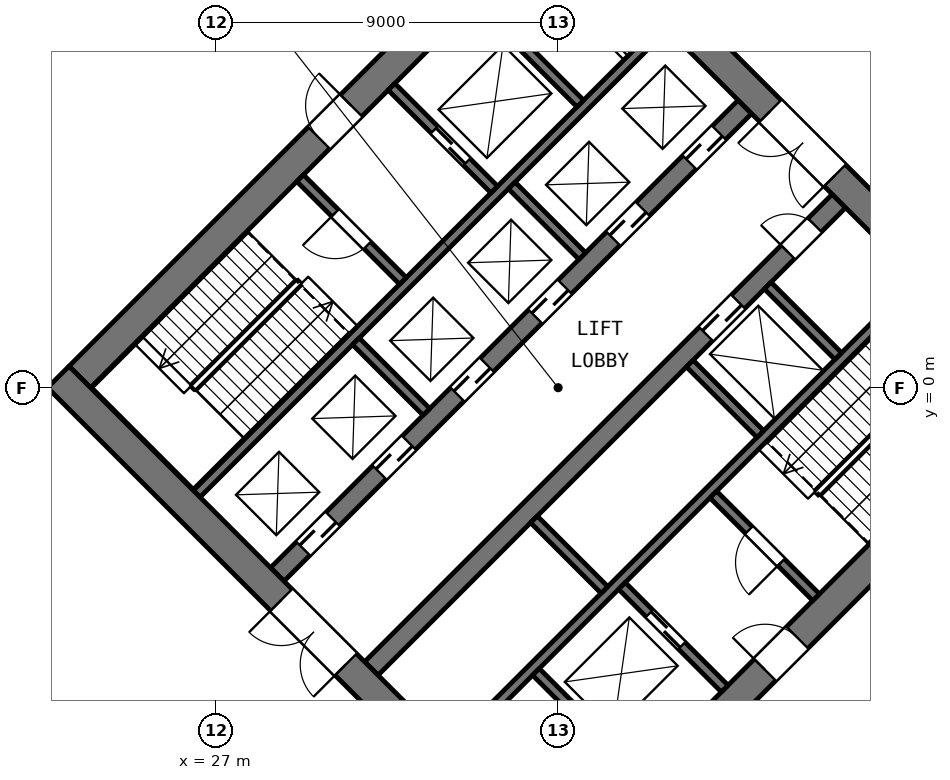
"""IFC4 building model, lengths in metres.
Left out: names, types, materials, properties, quantities, classifications, styles, units other than length and angle.
Written with IfcOpenShell. Run it as: python <this file> out.ifc"""

import sys

from ifc_helpers import new_model, si_unit, direction, frame, frame_2d, origin, place, context, subcontext, project, spatial, rectangle, extrude, element, fill, save


model = new_model("IFC4")
c1 = context("Model", 3, precision=1e-05, world=origin(), true_north=direction((0.0, 1.0)))
c2 = subcontext(c1, "Body", "Model", "MODEL_VIEW")
j1 = project(units=[si_unit("LENGTHUNIT", "METRE"), si_unit("PLANEANGLEUNIT", "RADIAN")], contexts=[c1])
p1 = place(None, origin())
s1 = spatial("IfcSite", under=j1, at=p1, CompositionType="ELEMENT")
p2 = place(p1, origin())
s2 = spatial("IfcBuilding", under=s1, at=p2, CompositionType="ELEMENT")
p3 = place(p2, frame((0.0, 0.0, 12.6)))
s3 = spatial("IfcBuildingStorey", under=s2, at=p3, CompositionType="ELEMENT", Elevation=12.6)
p4 = place(p3, frame((36.283, -12.586, 0.0), z_axis=(0.0, 0.0, 1.0), x_axis=(0.707106781187, 0.707106781187, 0.0)))
e1 = element("IfcWall", 1, at=p4, inside=s3, PredefinedType="SHEAR", context=c2, shape_type="SweptSolid", body=[
    extrude(rectangle(XDim=17.4, YDim=0.8, at=frame_2d((8.7, 0.0))), origin(), (0.0, 0.0, 1.0), 5.1),
])
p5 = place(p4, frame((7.3, 0.0, 0.0)))
e2 = element("IfcOpeningElement", 2, at=p5, cuts=e1, PredefinedType="OPENING", context=c2, shape_type="SweptSolid", body=[
    extrude(rectangle(XDim=1.2, YDim=2.1, at=frame_2d((0.6, 1.05))), frame((0.0, 0.41, 0.0), z_axis=(0.0, -1.0, 0.0), x_axis=(1.0, 0.0, 0.0)), (0.0, 0.0, 1.0), 0.82),
])
p6 = place(p4, frame((1.0, 0.0, 0.0)))
e3 = element("IfcOpeningElement", 3, at=p6, cuts=e1, PredefinedType="OPENING", context=c2, shape_type="SweptSolid", body=[
    extrude(rectangle(XDim=1.0, YDim=2.1, at=frame_2d((0.5, 1.05))), frame((0.0, 0.41, 0.0), z_axis=(0.0, -1.0, 0.0), x_axis=(1.0, 0.0, 0.0)), (0.0, 0.0, 1.0), 0.82),
])
p7 = place(p3, frame((33.207, -9.51, 0.0), z_axis=(0.0, 0.0, 1.0), x_axis=(0.707106781187, 0.707106781187, 0.0)))
e4 = element("IfcWall", 4, at=p7, inside=s3, PredefinedType="SHEAR", context=c2, shape_type="SweptSolid", body=[
    extrude(rectangle(XDim=17.4, YDim=0.25, at=frame_2d((8.7, 0.0))), origin(), (0.0, 0.0, 1.0), 5.1),
])
p8 = place(p3, frame((31.086, -7.389, 0.0), z_axis=(0.0, 0.0, 1.0), x_axis=(0.707106781187, 0.707106781187, 0.0)))
e5 = element("IfcWall", 5, at=p8, inside=s3, PredefinedType="SHEAR", context=c2, shape_type="SweptSolid", body=[
    extrude(rectangle(XDim=17.4, YDim=0.5, at=frame_2d((8.7, 0.0))), origin(), (0.0, 0.0, 1.0), 5.1),
])
p9 = place(p8, frame((12.45, 0.0, 0.0)))
e6 = element("IfcOpeningElement", 6, at=p9, cuts=e5, PredefinedType="OPENING", context=c2, shape_type="SweptSolid", body=[
    extrude(rectangle(XDim=1.2, YDim=2.1, at=frame_2d((0.6, 1.05))), frame((0.0, 0.26, 0.0), z_axis=(0.0, -1.0, 0.0), x_axis=(1.0, 0.0, 0.0)), (0.0, 0.0, 1.0), 0.52),
])
p10 = place(p8, frame((15.5, 0.0, 0.0)))
e7 = element("IfcOpeningElement", 7, at=p10, cuts=e5, PredefinedType="OPENING", context=c2, shape_type="SweptSolid", body=[
    extrude(rectangle(XDim=1.0, YDim=2.1, at=frame_2d((0.5, 1.05))), frame((0.0, 0.26, 0.0), z_axis=(0.0, -1.0, 0.0), x_axis=(1.0, 0.0, 0.0)), (0.0, 0.0, 1.0), 0.52),
])
p11 = place(p3, frame((28.611, -4.914, 0.0), z_axis=(0.0, 0.0, 1.0), x_axis=(0.707106781187, 0.707106781187, 0.0)))
e8 = element("IfcWall", 8, at=p11, inside=s3, PredefinedType="SHEAR", context=c2, shape_type="SweptSolid", body=[
    extrude(rectangle(XDim=17.4, YDim=0.5, at=frame_2d((8.7, 0.0))), origin(), (0.0, 0.0, 1.0), 5.1),
])
p12 = place(p11, frame((0.962, 0.0, 0.0)))
e9 = element("IfcOpeningElement", 9, at=p12, cuts=e8, PredefinedType="OPENING", context=c2, shape_type="SweptSolid", body=[
    extrude(rectangle(XDim=1.1, YDim=2.1, at=frame_2d((0.55, 1.05))), frame((0.0, 0.26, 0.0), z_axis=(0.0, -1.0, 0.0), x_axis=(1.0, 0.0, 0.0)), (0.0, 0.0, 1.0), 0.52),
])
p13 = place(p11, frame((3.8, 0.0, 0.0)))
e10 = element("IfcOpeningElement", 10, at=p13, cuts=e8, PredefinedType="OPENING", context=c2, shape_type="SweptSolid", body=[
    extrude(rectangle(XDim=1.1, YDim=2.1, at=frame_2d((0.55, 1.05))), frame((0.0, 0.26, 0.0), z_axis=(0.0, -1.0, 0.0), x_axis=(1.0, 0.0, 0.0)), (0.0, 0.0, 1.0), 0.52),
])
p14 = place(p11, frame((6.7, 0.0, 0.0)))
e11 = element("IfcOpeningElement", 11, at=p14, cuts=e8, PredefinedType="OPENING", context=c2, shape_type="SweptSolid", body=[
    extrude(rectangle(XDim=1.1, YDim=2.1, at=frame_2d((0.55, 1.05))), frame((0.0, 0.26, 0.0), z_axis=(0.0, -1.0, 0.0), x_axis=(1.0, 0.0, 0.0)), (0.0, 0.0, 1.0), 0.52),
])
p15 = place(p11, frame((9.6, 0.0, 0.0)))
e12 = element("IfcOpeningElement", 12, at=p15, cuts=e8, PredefinedType="OPENING", context=c2, shape_type="SweptSolid", body=[
    extrude(rectangle(XDim=1.1, YDim=2.1, at=frame_2d((0.55, 1.05))), frame((0.0, 0.26, 0.0), z_axis=(0.0, -1.0, 0.0), x_axis=(1.0, 0.0, 0.0)), (0.0, 0.0, 1.0), 0.52),
])
p16 = place(p11, frame((12.5, 0.0, 0.0)))
e13 = element("IfcOpeningElement", 13, at=p16, cuts=e8, PredefinedType="OPENING", context=c2, shape_type="SweptSolid", body=[
    extrude(rectangle(XDim=1.1, YDim=2.1, at=frame_2d((0.55, 1.05))), frame((0.0, 0.26, 0.0), z_axis=(0.0, -1.0, 0.0), x_axis=(1.0, 0.0, 0.0)), (0.0, 0.0, 1.0), 0.52),
])
p17 = place(p11, frame((15.337, 0.0, 0.0)))
e14 = element("IfcOpeningElement", 14, at=p17, cuts=e8, PredefinedType="OPENING", context=c2, shape_type="SweptSolid", body=[
    extrude(rectangle(XDim=1.1, YDim=2.1, at=frame_2d((0.55, 1.05))), frame((0.0, 0.26, 0.0), z_axis=(0.0, -1.0, 0.0), x_axis=(1.0, 0.0, 0.0)), (0.0, 0.0, 1.0), 0.52),
])
p18 = place(p3, frame((26.49, -2.793, 0.0), z_axis=(0.0, 0.0, 1.0), x_axis=(0.707106781187, 0.707106781187, 0.0)))
e15 = element("IfcWall", 15, at=p18, inside=s3, PredefinedType="SHEAR", context=c2, shape_type="SweptSolid", body=[
    extrude(rectangle(XDim=17.4, YDim=0.25, at=frame_2d((8.7, 0.0))), origin(), (0.0, 0.0, 1.0), 5.1),
])
p19 = place(p3, frame((23.414, 0.283, 0.0), z_axis=(0.0, 0.0, 1.0), x_axis=(0.707106781187, 0.707106781187, 0.0)))
e16 = element("IfcWall", 16, at=p19, inside=s3, PredefinedType="SHEAR", context=c2, shape_type="SweptSolid", body=[
    extrude(rectangle(XDim=17.4, YDim=0.8, at=frame_2d((8.7, 0.0))), origin(), (0.0, 0.0, 1.0), 5.1),
])
p20 = place(p19, frame((8.9, 0.0, 0.0)))
e17 = element("IfcOpeningElement", 17, at=p20, cuts=e16, PredefinedType="OPENING", context=c2, shape_type="SweptSolid", body=[
    extrude(rectangle(XDim=1.2, YDim=2.1, at=frame_2d((0.6, 1.05))), frame((0.0, 0.41, 0.0), z_axis=(0.0, -1.0, 0.0), x_axis=(1.0, 0.0, 0.0)), (0.0, 0.0, 1.0), 0.82),
])
p21 = place(p19, frame((14.8, 0.0, 0.0)))
e18 = element("IfcOpeningElement", 18, at=p21, cuts=e16, PredefinedType="OPENING", context=c2, shape_type="SweptSolid", body=[
    extrude(rectangle(XDim=0.9, YDim=2.1, at=frame_2d((0.45, 1.05))), frame((0.0, 0.41, 0.0), z_axis=(0.0, -1.0, 0.0), x_axis=(1.0, 0.0, 0.0)), (0.0, 0.0, 1.0), 0.82),
])
p22 = place(p19, frame((16.3, 0.0, 0.0)))
e19 = element("IfcOpeningElement", 19, at=p22, cuts=e16, PredefinedType="OPENING", context=c2, shape_type="SweptSolid", body=[
    extrude(rectangle(XDim=0.9, YDim=2.1, at=frame_2d((0.45, 1.05))), frame((0.0, 0.41, 0.0), z_axis=(0.0, -1.0, 0.0), x_axis=(1.0, 0.0, 0.0)), (0.0, 0.0, 1.0), 0.82),
])
p23 = place(p3, frame((36.283, -13.152, 0.0), z_axis=(0.0, 0.0, 1.0), x_axis=(-0.707106781187, 0.707106781187, 0.0)))
e20 = element("IfcWall", 20, at=p23, inside=s3, PredefinedType="SHEAR", context=c2, shape_type="SweptSolid", body=[
    extrude(rectangle(XDim=19.0, YDim=0.8, at=frame_2d((9.5, 0.0))), origin(), (0.0, 0.0, 1.0), 5.1),
])
p24 = place(p23, frame((8.3, 0.0, 0.0)))
e21 = element("IfcOpeningElement", 21, at=p24, cuts=e20, PredefinedType="OPENING", context=c2, shape_type="SweptSolid", body=[
    extrude(rectangle(XDim=2.4, YDim=2.1, at=frame_2d((1.2, 1.05))), frame((0.0, 0.41, 0.0), z_axis=(0.0, -1.0, 0.0), x_axis=(1.0, 0.0, 0.0)), (0.0, 0.0, 1.0), 0.82),
])
p25 = place(p3, frame((38.121, -10.182, 0.0), z_axis=(0.0, 0.0, 1.0), x_axis=(-0.707138693938, 0.707074866995, 0.0)))
e22 = element("IfcWall", 22, at=p25, inside=s3, PredefinedType="SHEAR", context=c2, shape_type="SweptSolid", body=[
    extrude(rectangle(XDim=3.825, YDim=0.25, at=frame_2d((1.913, 0.0))), origin(), (0.0, 0.0, 1.0), 5.1),
])
for number, where, z_axis, x_axis in (
    (23, (37.22, -5.321, 0.0), (0.0, 0.0, 1.0), (-0.707, 0.707, 0.0)),
    (24, (32.535, -0.636, 0.0), (0.0, 0.0, 1.0), (-0.707, 0.707, 0.0)),
):
    element("IfcWall", number, at=place(p3, frame(where, z_axis=z_axis, x_axis=x_axis)), inside=s3, PredefinedType="SHEAR", context=c2, shape_type="SweptSolid", body=[
        extrude(rectangle(XDim=2.625, YDim=0.25, at=frame_2d((1.312, 0.0))), origin(), (0.0, 0.0, 1.0), 5.1),
    ])
p26 = place(p3, frame((40.384, -7.92, 0.0), z_axis=(0.0, 0.0, 1.0), x_axis=(-0.707074866995, 0.707138693938, 0.0)))
e25 = element("IfcWall", 25, at=p26, inside=s3, PredefinedType="SHEAR", context=c2, shape_type="SweptSolid", body=[
    extrude(rectangle(XDim=3.825, YDim=0.25, at=frame_2d((1.913, 0.0))), origin(), (0.0, 0.0, 1.0), 5.1),
])
p27 = place(p26, frame((1.6, 0.0, 0.0)))
e26 = element("IfcOpeningElement", 26, at=p27, cuts=e25, PredefinedType="OPENING", context=c2, shape_type="SweptSolid", body=[
    extrude(rectangle(XDim=1.2, YDim=2.1, at=frame_2d((0.6, 1.05))), frame((0.0, 0.135, 0.0), z_axis=(0.0, -1.0, 0.0), x_axis=(1.0, 0.0, 0.0)), (0.0, 0.0, 1.0), 0.27),
])
p28 = place(p3, frame((31.917, 2.811, 0.0), z_axis=(0.0, 0.0, 1.0), x_axis=(-0.707106781187, 0.707106781187, 0.0)))
e27 = element("IfcWall", 27, at=p28, inside=s3, PredefinedType="SHEAR", context=c2, shape_type="SweptSolid", body=[
    extrude(rectangle(XDim=3.825, YDim=0.25, at=frame_2d((1.913, 0.0))), origin(), (0.0, 0.0, 1.0), 5.1),
])
p29 = place(p28, frame((1.325, 0.0, 0.0)))
e28 = element("IfcOpeningElement", 28, at=p29, cuts=e27, PredefinedType="OPENING", context=c2, shape_type="SweptSolid", body=[
    extrude(rectangle(XDim=1.2, YDim=2.1, at=frame_2d((0.6, 1.05))), frame((0.0, 0.135, 0.0), z_axis=(0.0, -1.0, 0.0), x_axis=(1.0, 0.0, 0.0)), (0.0, 0.0, 1.0), 0.27),
])
p30 = place(p3, frame((42.788, -5.515, 0.0), z_axis=(0.0, 0.0, 1.0), x_axis=(-0.707106781187, 0.707106781187, 0.0)))
e29 = element("IfcWall", 29, at=p30, inside=s3, PredefinedType="SHEAR", context=c2, shape_type="SweptSolid", body=[
    extrude(rectangle(XDim=3.825, YDim=0.25, at=frame_2d((1.913, 0.0))), origin(), (0.0, 0.0, 1.0), 5.1),
])
p31 = place(p30, frame((1.3, 0.0, 0.0)))
e30 = element("IfcOpeningElement", 30, at=p31, cuts=e29, PredefinedType="OPENING", context=c2, shape_type="SweptSolid", body=[
    extrude(rectangle(XDim=1.2, YDim=2.1, at=frame_2d((0.6, 1.05))), frame((0.0, 0.135, 0.0), z_axis=(0.0, -1.0, 0.0), x_axis=(1.0, 0.0, 0.0)), (0.0, 0.0, 1.0), 0.27),
])
p32 = place(p3, frame((34.321, 5.215, 0.0), z_axis=(0.0, 0.0, 1.0), x_axis=(-0.707074866995, 0.707138693938, 0.0)))
e31 = element("IfcWall", 31, at=p32, inside=s3, PredefinedType="SHEAR", context=c2, shape_type="SweptSolid", body=[
    extrude(rectangle(XDim=3.825, YDim=0.25, at=frame_2d((1.913, 0.0))), origin(), (0.0, 0.0, 1.0), 5.1),
])
p33 = place(p32, frame((1.025, 0.0, 0.0)))
e32 = element("IfcOpeningElement", 32, at=p33, cuts=e31, PredefinedType="OPENING", context=c2, shape_type="SweptSolid", body=[
    extrude(rectangle(XDim=1.2, YDim=2.1, at=frame_2d((0.6, 1.05))), frame((0.0, 0.135, 0.0), z_axis=(0.0, -1.0, 0.0), x_axis=(1.0, 0.0, 0.0)), (0.0, 0.0, 1.0), 0.27),
])
for number, where, z_axis, x_axis in (
    (33, (41.321, -1.22, 0.0), (0.0, 0.0, 1.0), (-0.707, 0.707, 0.0)),
    (34, (36.636, 3.465, 0.0), (0.0, 0.0, 1.0), (-0.707, 0.707, 0.0)),
):
    element("IfcWall", number, at=place(p3, frame(where, z_axis=z_axis, x_axis=x_axis)), inside=s3, PredefinedType="SHEAR", context=c2, shape_type="SweptSolid", body=[
        extrude(rectangle(XDim=2.625, YDim=0.25, at=frame_2d((1.312, 0.0))), origin(), (0.0, 0.0, 1.0), 5.1),
    ])
p34 = place(p3, frame((36.583, 7.478, 0.0), z_axis=(0.0, 0.0, 1.0), x_axis=(-0.707138693938, 0.707074866995, 0.0)))
e35 = element("IfcWall", 35, at=p34, inside=s3, PredefinedType="SHEAR", context=c2, shape_type="SweptSolid", body=[
    extrude(rectangle(XDim=3.825, YDim=0.25, at=frame_2d((1.913, 0.0))), origin(), (0.0, 0.0, 1.0), 5.1),
])
p35 = place(p3, frame((43.372, 0.831, 0.0), z_axis=(0.0, 0.0, 1.0), x_axis=(-0.707106781187, 0.707106781187, 0.0)))
e36 = element("IfcWall", 36, at=p35, inside=s3, PredefinedType="SHEAR", context=c2, shape_type="SweptSolid", body=[
    extrude(rectangle(XDim=2.625, YDim=0.25, at=frame_2d((1.312, 0.0))), origin(), (0.0, 0.0, 1.0), 5.1),
])
p36 = place(p3, frame((37.785, 8.68, 0.0), z_axis=(0.0, 0.0, 1.0), x_axis=(-0.707074866995, 0.707138693938, 0.0)))
e37 = element("IfcWall", 37, at=p36, inside=s3, PredefinedType="PARTITIONING", context=c2, shape_type="SweptSolid", body=[
    extrude(rectangle(XDim=3.825, YDim=0.15, at=frame_2d((1.913, 0.0))), origin(), (0.0, 0.0, 1.0), 5.1),
])
p37 = place(p3, frame((49.152, -0.283, 0.0), z_axis=(0.0, 0.0, 1.0), x_axis=(-0.707106781187, 0.707106781187, 0.0)))
e38 = element("IfcWall", 38, at=p37, inside=s3, PredefinedType="SHEAR", context=c2, shape_type="SweptSolid", body=[
    extrude(rectangle(XDim=19.0, YDim=0.8, at=frame_2d((9.5, 0.0))), origin(), (0.0, 0.0, 1.0), 5.1),
])
p38 = place(p37, frame((8.3, 0.0, 0.0)))
e39 = element("IfcOpeningElement", 39, at=p38, cuts=e38, PredefinedType="OPENING", context=c2, shape_type="SweptSolid", body=[
    extrude(rectangle(XDim=2.4, YDim=2.1, at=frame_2d((1.2, 1.05))), frame((0.0, 0.41, 0.0), z_axis=(0.0, -1.0, 0.0), x_axis=(1.0, 0.0, 0.0)), (0.0, 0.0, 1.0), 0.82),
])
p39 = place(p24, origin())
e40 = element("IfcDoor", 40, at=p39, inside=s3, OperationType="DOUBLE_DOOR_SINGLE_SWING", PredefinedType="DOOR", context=c2, shape_type="SweptSolid", body=[
    extrude(rectangle(XDim=2.4, YDim=2.1, at=frame_2d((1.2, 1.05))), frame((0.0, -0.225, 0.0), z_axis=(0.0, -1.0, 0.0), x_axis=(1.0, 0.0, 0.0)), (0.0, 0.0, 1.0), 0.05),
])
fill(e21, e40)
p40 = place(p38, origin())
e41 = element("IfcDoor", 41, at=p40, inside=s3, OperationType="DOUBLE_DOOR_SINGLE_SWING", PredefinedType="DOOR", context=c2, shape_type="SweptSolid", body=[
    extrude(rectangle(XDim=2.4, YDim=2.1, at=frame_2d((1.2, 1.05))), frame((0.0, 0.275, 0.0), z_axis=(0.0, -1.0, 0.0), x_axis=(1.0, 0.0, 0.0)), (0.0, 0.0, 1.0), 0.05),
])
fill(e39, e41)
p41 = place(p12, origin())
e42 = element("IfcDoor", 42, at=p41, inside=s3, OperationType="SLIDING_TO_LEFT", PredefinedType="DOOR", context=c2, shape_type="SweptSolid", body=[
    extrude(rectangle(XDim=1.1, YDim=2.1, at=frame_2d((0.55, 1.05))), frame((0.0, 0.025, 0.0), z_axis=(0.0, -1.0, 0.0), x_axis=(1.0, 0.0, 0.0)), (0.0, 0.0, 1.0), 0.05),
])
fill(e9, e42)
p42 = place(p13, origin())
e43 = element("IfcDoor", 43, at=p42, inside=s3, OperationType="SLIDING_TO_LEFT", PredefinedType="DOOR", context=c2, shape_type="SweptSolid", body=[
    extrude(rectangle(XDim=1.1, YDim=2.1, at=frame_2d((0.55, 1.05))), frame((0.0, 0.025, 0.0), z_axis=(0.0, -1.0, 0.0), x_axis=(1.0, 0.0, 0.0)), (0.0, 0.0, 1.0), 0.05),
])
fill(e10, e43)
p43 = place(p14, origin())
e44 = element("IfcDoor", 44, at=p43, inside=s3, OperationType="SLIDING_TO_LEFT", PredefinedType="DOOR", context=c2, shape_type="SweptSolid", body=[
    extrude(rectangle(XDim=1.1, YDim=2.1, at=frame_2d((0.55, 1.05))), frame((0.0, 0.025, 0.0), z_axis=(0.0, -1.0, 0.0), x_axis=(1.0, 0.0, 0.0)), (0.0, 0.0, 1.0), 0.05),
])
fill(e11, e44)
p44 = place(p15, origin())
e45 = element("IfcDoor", 45, at=p44, inside=s3, OperationType="SLIDING_TO_LEFT", PredefinedType="DOOR", context=c2, shape_type="SweptSolid", body=[
    extrude(rectangle(XDim=1.1, YDim=2.1, at=frame_2d((0.55, 1.05))), frame((0.0, 0.025, 0.0), z_axis=(0.0, -1.0, 0.0), x_axis=(1.0, 0.0, 0.0)), (0.0, 0.0, 1.0), 0.05),
])
fill(e12, e45)
p45 = place(p16, origin())
e46 = element("IfcDoor", 46, at=p45, inside=s3, OperationType="SLIDING_TO_LEFT", PredefinedType="DOOR", context=c2, shape_type="SweptSolid", body=[
    extrude(rectangle(XDim=1.1, YDim=2.1, at=frame_2d((0.55, 1.05))), frame((0.0, 0.025, 0.0), z_axis=(0.0, -1.0, 0.0), x_axis=(1.0, 0.0, 0.0)), (0.0, 0.0, 1.0), 0.05),
])
fill(e13, e46)
p46 = place(p17, origin())
e47 = element("IfcDoor", 47, at=p46, inside=s3, OperationType="SLIDING_TO_LEFT", PredefinedType="DOOR", context=c2, shape_type="SweptSolid", body=[
    extrude(rectangle(XDim=1.1, YDim=2.1, at=frame_2d((0.55, 1.05))), frame((0.0, 0.025, 0.0), z_axis=(0.0, -1.0, 0.0), x_axis=(1.0, 0.0, 0.0)), (0.0, 0.0, 1.0), 0.05),
])
fill(e14, e47)
p47 = place(p9, origin())
e48 = element("IfcDoor", 48, at=p47, inside=s3, OperationType="SLIDING_TO_LEFT", PredefinedType="DOOR", context=c2, shape_type="SweptSolid", body=[
    extrude(rectangle(XDim=1.2, YDim=2.1, at=frame_2d((0.6, 1.05))), frame((0.0, 0.025, 0.0), z_axis=(0.0, -1.0, 0.0), x_axis=(1.0, 0.0, 0.0)), (0.0, 0.0, 1.0), 0.05),
])
fill(e6, e48)
p48 = place(p33, origin())
e49 = element("IfcDoor", 49, at=p48, inside=s3, OperationType="SLIDING_TO_LEFT", PredefinedType="DOOR", context=c2, shape_type="SweptSolid", body=[
    extrude(rectangle(XDim=1.2, YDim=2.1, at=frame_2d((0.6, 1.05))), frame((0.0, 0.025, 0.0), z_axis=(0.0, -1.0, 0.0), x_axis=(1.0, 0.0, 0.0)), (0.0, 0.0, 1.0), 0.05),
])
fill(e32, e49)
p49 = place(p27, origin())
e50 = element("IfcDoor", 50, at=p49, inside=s3, OperationType="SLIDING_TO_LEFT", PredefinedType="DOOR", context=c2, shape_type="SweptSolid", body=[
    extrude(rectangle(XDim=1.2, YDim=2.1, at=frame_2d((0.6, 1.05))), frame((0.0, 0.025, 0.0), z_axis=(0.0, -1.0, 0.0), x_axis=(1.0, 0.0, 0.0)), (0.0, 0.0, 1.0), 0.05),
])
fill(e26, e50)
p50 = place(p10, origin())
e51 = element("IfcDoor", 51, at=p50, inside=s3, OperationType="SINGLE_SWING_LEFT", PredefinedType="DOOR", context=c2, shape_type="SweptSolid", body=[
    extrude(rectangle(XDim=1.0, YDim=2.1, at=frame_2d((0.5, 1.05))), frame((0.0, 0.025, 0.0), z_axis=(0.0, -1.0, 0.0), x_axis=(1.0, 0.0, 0.0)), (0.0, 0.0, 1.0), 0.05),
])
fill(e7, e51)
p51 = place(p29, origin())
e52 = element("IfcDoor", 52, at=p51, inside=s3, OperationType="SINGLE_SWING_RIGHT", PredefinedType="DOOR", context=c2, shape_type="SweptSolid", body=[
    extrude(rectangle(XDim=1.2, YDim=2.1, at=frame_2d((0.6, 1.05))), frame((0.0, 0.025, 0.0), z_axis=(0.0, -1.0, 0.0), x_axis=(1.0, 0.0, 0.0)), (0.0, 0.0, 1.0), 0.05),
])
fill(e28, e52)
p52 = place(p31, origin())
e53 = element("IfcDoor", 53, at=p52, inside=s3, OperationType="SINGLE_SWING_LEFT", PredefinedType="DOOR", context=c2, shape_type="SweptSolid", body=[
    extrude(rectangle(XDim=1.2, YDim=2.1, at=frame_2d((0.6, 1.05))), frame((0.0, 0.025, 0.0), z_axis=(0.0, -1.0, 0.0), x_axis=(1.0, 0.0, 0.0)), (0.0, 0.0, 1.0), 0.05),
])
fill(e30, e53)
p53 = place(p20, origin())
e54 = element("IfcDoor", 54, at=p53, inside=s3, OperationType="SINGLE_SWING_RIGHT", PredefinedType="DOOR", context=c2, shape_type="SweptSolid", body=[
    extrude(rectangle(XDim=1.2, YDim=2.1, at=frame_2d((0.6, 1.05))), frame((0.0, -0.225, 0.0), z_axis=(0.0, -1.0, 0.0), x_axis=(1.0, 0.0, 0.0)), (0.0, 0.0, 1.0), 0.05),
])
fill(e17, e54)
p54 = place(p5, origin())
e55 = element("IfcDoor", 55, at=p54, inside=s3, OperationType="SINGLE_SWING_LEFT", PredefinedType="DOOR", context=c2, shape_type="SweptSolid", body=[
    extrude(rectangle(XDim=1.2, YDim=2.1, at=frame_2d((0.6, 1.05))), frame((0.0, 0.275, 0.0), z_axis=(0.0, -1.0, 0.0), x_axis=(1.0, 0.0, 0.0)), (0.0, 0.0, 1.0), 0.05),
])
fill(e2, e55)
save(model, sys.argv[1])
